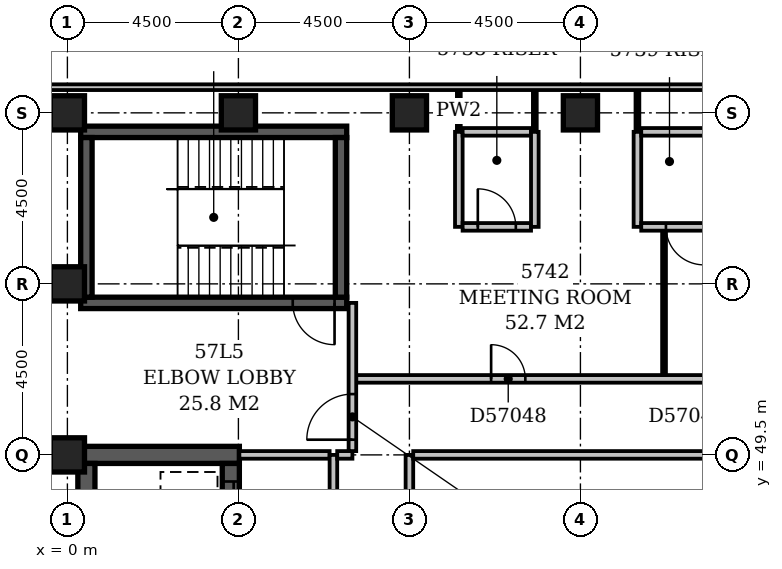
"""IFC4 building model, lengths in metres.
Left out: names, types, materials, properties, quantities, classifications, styles, units other than length and angle.
Written with IfcOpenShell. Run it as: python <this file> out.ifc"""

import sys

from ifc_helpers import new_model, si_unit, direction, frame, frame_2d, origin, origin_2d, place, context, subcontext, project, spatial, rectangle, extrude, element, fill, save


model = new_model("IFC4")
c1 = context("Model", 3, precision=1e-05, world=origin(), true_north=direction((0.0, 1.0)))
c2 = subcontext(c1, "Body", "Model", "MODEL_VIEW")
j1 = project(units=[si_unit("LENGTHUNIT", "METRE"), si_unit("PLANEANGLEUNIT", "RADIAN")], contexts=[c1])
p1 = place(None, origin())
s1 = spatial("IfcSite", under=j1, at=p1, CompositionType="ELEMENT")
p2 = place(p1, origin())
s2 = spatial("IfcBuilding", under=s1, at=p2, CompositionType="ELEMENT")
p3 = place(p2, frame((0.0, 0.0, 222.2)))
s3 = spatial("IfcBuildingStorey", under=s2, at=p3, CompositionType="ELEMENT", Elevation=222.2)
p4 = place(p3, frame((0.275, 49.5, -0.3), z_axis=(0.0, 0.0, 1.0), x_axis=(1.0, 0.0, 0.0)))
e1 = element("IfcWall", 1, at=p4, inside=s3, PredefinedType="SHEAR", context=c2, shape_type="SweptSolid", body=[
    extrude(rectangle(XDim=4.25, YDim=0.45, at=frame_2d((2.125, 0.0))), origin(), (0.0, 0.0, 1.0), 3.6),
])
p5 = place(p3, frame((0.35, 53.5, -0.3), z_axis=(0.0, 0.0, 1.0), x_axis=(1.0, 0.0, 0.0)))
e2 = element("IfcWall", 2, at=p5, inside=s3, PredefinedType="SHEAR", context=c2, shape_type="SweptSolid", body=[
    extrude(rectangle(XDim=7.0, YDim=0.3, at=frame_2d((3.5, 0.0))), origin(), (0.0, 0.0, 1.0), 3.6),
])
p6 = place(p5, frame((5.58, 0.0, 0.3)))
e3 = element("IfcOpeningElement", 3, at=p6, cuts=e2, PredefinedType="OPENING", context=c2, shape_type="SweptSolid", body=[
    extrude(rectangle(XDim=1.1, YDim=2.1, at=frame_2d((0.55, 1.05))), frame((0.0, 0.162, 0.0), z_axis=(0.0, -1.0, 0.0), x_axis=(1.0, 0.0, 0.0)), (0.0, 0.0, 1.0), 0.324),
])
p7 = place(p3, frame((0.35, 58.0, -0.3), z_axis=(0.0, 0.0, 1.0), x_axis=(1.0, 0.0, 0.0)))
e4 = element("IfcWall", 4, at=p7, inside=s3, PredefinedType="SHEAR", context=c2, shape_type="SweptSolid", body=[
    extrude(rectangle(XDim=7.0, YDim=0.3, at=frame_2d((3.5, 0.0))), origin(), (0.0, 0.0, 1.0), 3.6),
])
p8 = place(p3, frame((0.5, 27.15, -0.3), z_axis=(0.0, 0.0, 1.0), x_axis=(0.0, 1.0, 0.0)))
e5 = element("IfcWall", 5, at=p8, inside=s3, PredefinedType="SHEAR", context=c2, shape_type="SweptSolid", body=[
    extrude(rectangle(XDim=22.125, YDim=0.45, at=frame_2d((11.062, 0.0))), origin(), (0.0, 0.0, 1.0), 3.6),
])
p9 = place(p3, frame((0.5, 53.65, -0.3), z_axis=(0.0, 0.0, 1.0), x_axis=(0.0, 1.0, 0.0)))
e6 = element("IfcWall", 6, at=p9, inside=s3, PredefinedType="SHEAR", context=c2, shape_type="SweptSolid", body=[
    extrude(rectangle(XDim=4.2, YDim=0.3, at=frame_2d((2.1, 0.0))), origin(), (0.0, 0.0, 1.0), 3.6),
])
p10 = place(p3, frame((4.3, 27.15, -0.3), z_axis=(0.0, 0.0, 1.0), x_axis=(0.0, 1.0, 0.0)))
e7 = element("IfcWall", 7, at=p10, inside=s3, PredefinedType="SHEAR", context=c2, shape_type="SweptSolid", body=[
    extrude(rectangle(XDim=22.125, YDim=0.45, at=frame_2d((11.062, 0.0))), origin(), (0.0, 0.0, 1.0), 3.6),
])
p11 = place(p10, frame((3.05, 0.0, 0.3)))
e8 = element("IfcOpeningElement", 8, at=p11, cuts=e7, PredefinedType="OPENING", context=c2, shape_type="SweptSolid", body=[
    extrude(rectangle(XDim=1.1, YDim=2.1, at=frame_2d((0.55, 1.05))), frame((0.0, 0.237, 0.0), z_axis=(0.0, -1.0, 0.0), x_axis=(1.0, 0.0, 0.0)), (0.0, 0.0, 1.0), 0.474),
])
p12 = place(p10, frame((0.55, 0.0, 0.3)))
e9 = element("IfcOpeningElement", 9, at=p12, cuts=e7, PredefinedType="OPENING", context=c2, shape_type="SweptSolid", body=[
    extrude(rectangle(XDim=1.1, YDim=2.1, at=frame_2d((0.55, 1.05))), frame((0.0, 0.237, 0.0), z_axis=(0.0, -1.0, 0.0), x_axis=(1.0, 0.0, 0.0)), (0.0, 0.0, 1.0), 0.474),
])
p13 = place(p10, frame((20.55, 0.0, 0.3)))
e10 = element("IfcOpeningElement", 10, at=p13, cuts=e7, PredefinedType="OPENING", context=c2, shape_type="SweptSolid", body=[
    extrude(rectangle(XDim=1.1, YDim=2.1, at=frame_2d((0.55, 1.05))), frame((0.0, 0.237, 0.0), z_axis=(0.0, -1.0, 0.0), x_axis=(1.0, 0.0, 0.0)), (0.0, 0.0, 1.0), 0.474),
])
p14 = place(p10, frame((18.05, 0.0, 0.3)))
e11 = element("IfcOpeningElement", 11, at=p14, cuts=e7, PredefinedType="OPENING", context=c2, shape_type="SweptSolid", body=[
    extrude(rectangle(XDim=1.1, YDim=2.1, at=frame_2d((0.55, 1.05))), frame((0.0, 0.237, 0.0), z_axis=(0.0, -1.0, 0.0), x_axis=(1.0, 0.0, 0.0)), (0.0, 0.0, 1.0), 0.474),
])
p15 = place(p10, frame((15.55, 0.0, 0.3)))
e12 = element("IfcOpeningElement", 12, at=p15, cuts=e7, PredefinedType="OPENING", context=c2, shape_type="SweptSolid", body=[
    extrude(rectangle(XDim=1.1, YDim=2.1, at=frame_2d((0.55, 1.05))), frame((0.0, 0.237, 0.0), z_axis=(0.0, -1.0, 0.0), x_axis=(1.0, 0.0, 0.0)), (0.0, 0.0, 1.0), 0.474),
])
p16 = place(p10, frame((13.05, 0.0, 0.3)))
e13 = element("IfcOpeningElement", 13, at=p16, cuts=e7, PredefinedType="OPENING", context=c2, shape_type="SweptSolid", body=[
    extrude(rectangle(XDim=1.1, YDim=2.1, at=frame_2d((0.55, 1.05))), frame((0.0, 0.237, 0.0), z_axis=(0.0, -1.0, 0.0), x_axis=(1.0, 0.0, 0.0)), (0.0, 0.0, 1.0), 0.474),
])
p17 = place(p10, frame((10.55, 0.0, 0.3)))
e14 = element("IfcOpeningElement", 14, at=p17, cuts=e7, PredefinedType="OPENING", context=c2, shape_type="SweptSolid", body=[
    extrude(rectangle(XDim=1.1, YDim=2.1, at=frame_2d((0.55, 1.05))), frame((0.0, 0.237, 0.0), z_axis=(0.0, -1.0, 0.0), x_axis=(1.0, 0.0, 0.0)), (0.0, 0.0, 1.0), 0.474),
])
p18 = place(p10, frame((8.05, 0.0, 0.3)))
e15 = element("IfcOpeningElement", 15, at=p18, cuts=e7, PredefinedType="OPENING", context=c2, shape_type="SweptSolid", body=[
    extrude(rectangle(XDim=1.1, YDim=2.1, at=frame_2d((0.55, 1.05))), frame((0.0, 0.237, 0.0), z_axis=(0.0, -1.0, 0.0), x_axis=(1.0, 0.0, 0.0)), (0.0, 0.0, 1.0), 0.474),
])
p19 = place(p10, frame((5.55, 0.0, 0.3)))
e16 = element("IfcOpeningElement", 16, at=p19, cuts=e7, PredefinedType="OPENING", context=c2, shape_type="SweptSolid", body=[
    extrude(rectangle(XDim=1.1, YDim=2.1, at=frame_2d((0.55, 1.05))), frame((0.0, 0.237, 0.0), z_axis=(0.0, -1.0, 0.0), x_axis=(1.0, 0.0, 0.0)), (0.0, 0.0, 1.0), 0.474),
])
p20 = place(p3, frame((7.2, 53.65, -0.3), z_axis=(0.0, 0.0, 1.0), x_axis=(0.0, 1.0, 0.0)))
e17 = element("IfcWall", 17, at=p20, inside=s3, PredefinedType="SHEAR", context=c2, shape_type="SweptSolid", body=[
    extrude(rectangle(XDim=4.2, YDim=0.3, at=frame_2d((2.1, 0.0))), origin(), (0.0, 0.0, 1.0), 3.6),
])
for number, where, z_axis, x_axis in (
    (18, (0.0, 49.5, -0.3), (0.0, 0.0, 1.0), (1.0, 0.0, 0.0)),
    (19, (0.0, 54.0, -0.3), (0.0, 0.0, 1.0), (1.0, 0.0, 0.0)),
    (20, (0.0, 58.5, -0.3), (0.0, 0.0, 1.0), (1.0, 0.0, 0.0)),
    (21, (4.5, 58.5, -0.3), (0.0, 0.0, 1.0), (1.0, 0.0, 0.0)),
    (22, (9.0, 58.5, -0.3), (0.0, 0.0, 1.0), (1.0, 0.0, 0.0)),
    (23, (13.5, 58.5, -0.3), (0.0, 0.0, 1.0), (1.0, 0.0, 0.0)),
):
    element("IfcColumn", number, at=place(p3, frame(where, z_axis=z_axis, x_axis=x_axis)), inside=s3, PredefinedType="COLUMN", context=c2, shape_type="SweptSolid", body=[
        extrude(rectangle(XDim=0.9, YDim=0.9, at=origin_2d()), origin(), (0.0, 0.0, 1.0), 3.6),
    ])
p21 = place(p3, frame((50.1, 59.175, 0.0), z_axis=(0.0, 0.0, 1.0), x_axis=(-1.0, 0.0, 0.0)))
e24 = element("IfcWall", 24, at=p21, inside=s3, PredefinedType="STANDARD", context=c2, shape_type="SweptSolid", body=[
    extrude(rectangle(XDim=50.85, YDim=0.15, at=frame_2d((25.425, 0.0))), origin(), (0.0, 0.0, 1.0), 2.7),
])
p22 = place(p3, frame((7.0, 34.6, 0.0), z_axis=(0.0, 0.0, 1.0), x_axis=(0.0, 1.0, 0.0)))
e25 = element("IfcWall", 25, at=p22, inside=s3, PredefinedType="PARTITIONING", context=c2, shape_type="SweptSolid", body=[
    extrude(rectangle(XDim=14.9, YDim=0.2, at=frame_2d((7.45, 0.0))), origin(), (0.0, 0.0, 1.0), 3.3),
])
p23 = place(p22, frame((2.8, 0.0, 0.0)))
e26 = element("IfcOpeningElement", 26, at=p23, cuts=e25, PredefinedType="OPENING", context=c2, shape_type="SweptSolid", body=[
    extrude(rectangle(XDim=1.2, YDim=2.1, at=frame_2d((0.6, 1.05))), frame((0.0, 0.112, 0.0), z_axis=(0.0, -1.0, 0.0), x_axis=(1.0, 0.0, 0.0)), (0.0, 0.0, 1.0), 0.224),
])
p24 = place(p22, frame((9.8, 0.0, 0.0)))
e27 = element("IfcOpeningElement", 27, at=p24, cuts=e25, PredefinedType="OPENING", context=c2, shape_type="SweptSolid", body=[
    extrude(rectangle(XDim=1.2, YDim=2.1, at=frame_2d((0.6, 1.05))), frame((0.0, 0.112, 0.0), z_axis=(0.0, -1.0, 0.0), x_axis=(1.0, 0.0, 0.0)), (0.0, 0.0, 1.0), 0.224),
])
p25 = place(p3, frame((4.525, 49.5, 0.0), z_axis=(0.0, 0.0, 1.0), x_axis=(1.0, 0.0, 0.0)))
e28 = element("IfcWall", 28, at=p25, inside=s3, PredefinedType="PARTITIONING", context=c2, shape_type="SweptSolid", body=[
    extrude(rectangle(XDim=2.375, YDim=0.2, at=frame_2d((1.188, 0.0))), origin(), (0.0, 0.0, 1.0), 3.3),
])
p26 = place(p3, frame((7.1, 49.5, 0.0), z_axis=(0.0, 0.0, 1.0), x_axis=(1.0, 0.0, 0.0)))
e29 = element("IfcWall", 29, at=p26, inside=s3, PredefinedType="PARTITIONING", context=c2, shape_type="SweptSolid", body=[
    extrude(rectangle(XDim=0.4, YDim=0.2, at=frame_2d((0.2, 0.0))), origin(), (0.0, 0.0, 1.0), 3.3),
])
p27 = place(p3, frame((7.5, 49.6, 0.0), z_axis=(0.0, 0.0, 1.0), x_axis=(0.0, 1.0, 0.0)))
e30 = element("IfcWall", 30, at=p27, inside=s3, PredefinedType="PARTITIONING", context=c2, shape_type="SweptSolid", body=[
    extrude(rectangle(XDim=3.9, YDim=0.2, at=frame_2d((1.95, 0.0))), origin(), (0.0, 0.0, 1.0), 3.3),
])
p28 = place(p27, frame((0.3, 0.0, 0.0)))
e31 = element("IfcOpeningElement", 31, at=p28, cuts=e30, PredefinedType="OPENING", context=c2, shape_type="SweptSolid", body=[
    extrude(rectangle(XDim=1.2, YDim=2.1, at=frame_2d((0.6, 1.05))), frame((0.0, 0.112, 0.0), z_axis=(0.0, -1.0, 0.0), x_axis=(1.0, 0.0, 0.0)), (0.0, 0.0, 1.0), 0.224),
])
p29 = place(p3, frame((9.0, 38.0, 0.0), z_axis=(0.0, 0.0, 1.0), x_axis=(0.0, 1.0, 0.0)))
e32 = element("IfcWall", 32, at=p29, inside=s3, PredefinedType="PARTITIONING", context=c2, shape_type="SweptSolid", body=[
    extrude(rectangle(XDim=11.5, YDim=0.2, at=frame_2d((5.75, 0.0))), origin(), (0.0, 0.0, 1.0), 3.3),
])
p30 = place(p29, frame((5.25, 0.0, 0.0)))
e33 = element("IfcOpeningElement", 33, at=p30, cuts=e32, PredefinedType="OPENING", context=c2, shape_type="SweptSolid", body=[
    extrude(rectangle(XDim=0.9, YDim=2.1, at=frame_2d((0.45, 1.05))), frame((0.0, 0.112, 0.0), z_axis=(0.0, -1.0, 0.0), x_axis=(1.0, 0.0, 0.0)), (0.0, 0.0, 1.0), 0.224),
])
p31 = place(p3, frame((9.1, 49.5, 0.0), z_axis=(0.0, 0.0, 1.0), x_axis=(1.0, 0.0, 0.0)))
e34 = element("IfcWall", 34, at=p31, inside=s3, PredefinedType="PARTITIONING", context=c2, shape_type="SweptSolid", body=[
    extrude(rectangle(XDim=11.3, YDim=0.2, at=frame_2d((5.65, 0.0))), origin(), (0.0, 0.0, 1.0), 3.3),
])
p32 = place(p31, frame((9.15, 0.0, 0.0)))
e35 = element("IfcOpeningElement", 35, at=p32, cuts=e34, PredefinedType="OPENING", context=c2, shape_type="SweptSolid", body=[
    extrude(rectangle(XDim=0.9, YDim=2.1, at=frame_2d((0.45, 1.05))), frame((0.0, 0.112, 0.0), z_axis=(0.0, -1.0, 0.0), x_axis=(1.0, 0.0, 0.0)), (0.0, 0.0, 1.0), 0.224),
])
p33 = place(p3, frame((7.6, 51.5, 0.0), z_axis=(0.0, 0.0, 1.0), x_axis=(1.0, 0.0, 0.0)))
e36 = element("IfcWall", 36, at=p33, inside=s3, PredefinedType="PARTITIONING", context=c2, shape_type="SweptSolid", body=[
    extrude(rectangle(XDim=15.3, YDim=0.2, at=frame_2d((7.65, 0.0))), origin(), (0.0, 0.0, 1.0), 3.3),
])
p34 = place(p33, frame((3.55, 0.0, 0.0)))
e37 = element("IfcOpeningElement", 37, at=p34, cuts=e36, PredefinedType="OPENING", context=c2, shape_type="SweptSolid", body=[
    extrude(rectangle(XDim=0.9, YDim=2.1, at=frame_2d((0.45, 1.05))), frame((0.0, 0.112, 0.0), z_axis=(0.0, -1.0, 0.0), x_axis=(1.0, 0.0, 0.0)), (0.0, 0.0, 1.0), 0.224),
])
p35 = place(p33, frame((11.3, 0.0, 0.0)))
e38 = element("IfcOpeningElement", 38, at=p35, cuts=e36, PredefinedType="OPENING", context=c2, shape_type="SweptSolid", body=[
    extrude(rectangle(XDim=0.9, YDim=2.1, at=frame_2d((0.45, 1.05))), frame((0.0, 0.112, 0.0), z_axis=(0.0, -1.0, 0.0), x_axis=(1.0, 0.0, 0.0)), (0.0, 0.0, 1.0), 0.224),
])
p36 = place(p3, frame((15.7, 51.6, 0.0), z_axis=(0.0, 0.0, 1.0), x_axis=(0.0, 1.0, 0.0)))
e39 = element("IfcWall", 39, at=p36, inside=s3, PredefinedType="PARTITIONING", context=c2, shape_type="SweptSolid", body=[
    extrude(rectangle(XDim=3.8, YDim=0.1, at=frame_2d((1.9, 0.0))), origin(), (0.0, 0.0, 1.0), 3.3),
])
p37 = place(p3, frame((10.3, 55.5, 0.0), z_axis=(0.0, 0.0, 1.0), x_axis=(0.0, 1.0, 0.0)))
e40 = element("IfcWall", 40, at=p37, inside=s3, PredefinedType="PARTITIONING", context=c2, shape_type="SweptSolid", body=[
    extrude(rectangle(XDim=2.5, YDim=0.2, at=frame_2d((1.25, 0.0))), origin(), (0.0, 0.0, 1.0), 3.3),
])
p38 = place(p3, frame((10.4, 55.5, 0.0), z_axis=(0.0, 0.0, 1.0), x_axis=(1.0, 0.0, 0.0)))
e41 = element("IfcWall", 41, at=p38, inside=s3, PredefinedType="PARTITIONING", context=c2, shape_type="SweptSolid", body=[
    extrude(rectangle(XDim=1.8, YDim=0.2, at=frame_2d((0.9, 0.0))), origin(), (0.0, 0.0, 1.0), 3.3),
])
p39 = place(p38, frame((0.4, 0.0, 0.0)))
e42 = element("IfcOpeningElement", 42, at=p39, cuts=e41, PredefinedType="OPENING", context=c2, shape_type="SweptSolid", body=[
    extrude(rectangle(XDim=1.0, YDim=2.1, at=frame_2d((0.5, 1.05))), frame((0.0, 0.112, 0.0), z_axis=(0.0, -1.0, 0.0), x_axis=(1.0, 0.0, 0.0)), (0.0, 0.0, 1.0), 0.224),
])
for number, where, z_axis, x_axis in (
    (43, (12.3, 55.5, 0.0), (0.0, 0.0, 1.0), (0.0, 1.0, 0.0)),
    (44, (15.0, 55.5, 0.0), (0.0, 0.0, 1.0), (0.0, 1.0, 0.0)),
):
    element("IfcWall", number, at=place(p3, frame(where, z_axis=z_axis, x_axis=x_axis)), inside=s3, PredefinedType="PARTITIONING", context=c2, shape_type="SweptSolid", body=[
        extrude(rectangle(XDim=2.5, YDim=0.2, at=frame_2d((1.25, 0.0))), origin(), (0.0, 0.0, 1.0), 3.3),
    ])
p40 = place(p3, frame((15.1, 55.5, 0.0), z_axis=(0.0, 0.0, 1.0), x_axis=(1.0, 0.0, 0.0)))
e45 = element("IfcWall", 45, at=p40, inside=s3, PredefinedType="PARTITIONING", context=c2, shape_type="SweptSolid", body=[
    extrude(rectangle(XDim=1.8, YDim=0.2, at=frame_2d((0.9, 0.0))), origin(), (0.0, 0.0, 1.0), 3.3),
])
p41 = place(p40, frame((0.65, 0.0, 0.0)))
e46 = element("IfcOpeningElement", 46, at=p41, cuts=e45, PredefinedType="OPENING", context=c2, shape_type="SweptSolid", body=[
    extrude(rectangle(XDim=1.0, YDim=2.1, at=frame_2d((0.5, 1.05))), frame((0.0, 0.112, 0.0), z_axis=(0.0, -1.0, 0.0), x_axis=(1.0, 0.0, 0.0)), (0.0, 0.0, 1.0), 0.224),
])
p42 = place(p3, frame((10.3, 58.0, 0.0), z_axis=(0.0, 0.0, 1.0), x_axis=(0.0, 1.0, 0.0)))
e47 = element("IfcWall", 47, at=p42, inside=s3, PredefinedType="PARTITIONING", context=c2, shape_type="SweptSolid", body=[
    extrude(rectangle(XDim=1.1, YDim=0.1, at=frame_2d((0.55, 0.0))), origin(), (0.0, 0.0, 1.0), 3.3),
])
p43 = place(p3, frame((10.4, 58.0, 0.0), z_axis=(0.0, 0.0, 1.0), x_axis=(1.0, 0.0, 0.0)))
e48 = element("IfcWall", 48, at=p43, inside=s3, PredefinedType="PARTITIONING", context=c2, shape_type="SweptSolid", body=[
    extrude(rectangle(XDim=1.8, YDim=0.2, at=frame_2d((0.9, 0.0))), origin(), (0.0, 0.0, 1.0), 3.3),
])
for number, where, z_axis, x_axis in (
    (49, (12.3, 58.0, 0.0), (0.0, 0.0, 1.0), (0.0, 1.0, 0.0)),
    (50, (15.0, 58.0, 0.0), (0.0, 0.0, 1.0), (0.0, 1.0, 0.0)),
):
    element("IfcWall", number, at=place(p3, frame(where, z_axis=z_axis, x_axis=x_axis)), inside=s3, PredefinedType="PARTITIONING", context=c2, shape_type="SweptSolid", body=[
        extrude(rectangle(XDim=1.1, YDim=0.1, at=frame_2d((0.55, 0.0))), origin(), (0.0, 0.0, 1.0), 3.3),
    ])
p44 = place(p3, frame((15.1, 58.0, 0.0), z_axis=(0.0, 0.0, 1.0), x_axis=(1.0, 0.0, 0.0)))
e51 = element("IfcWall", 51, at=p44, inside=s3, PredefinedType="PARTITIONING", context=c2, shape_type="SweptSolid", body=[
    extrude(rectangle(XDim=1.8, YDim=0.2, at=frame_2d((0.9, 0.0))), origin(), (0.0, 0.0, 1.0), 3.3),
])
p45 = place(p28, origin())
e52 = element("IfcDoor", 52, at=p45, inside=s3, OperationType="SINGLE_SWING_LEFT", PredefinedType="DOOR", context=c2, shape_type="SweptSolid", body=[
    extrude(rectangle(XDim=1.2, YDim=2.1, at=frame_2d((0.6, 1.05))), frame((0.0, 0.025, 0.0), z_axis=(0.0, -1.0, 0.0), x_axis=(1.0, 0.0, 0.0)), (0.0, 0.0, 1.0), 0.05),
])
fill(e31, e52)
p46 = place(p13, origin())
e53 = element("IfcDoor", 53, at=p46, inside=s3, OperationType="SLIDING_TO_LEFT", PredefinedType="DOOR", context=c2, shape_type="SweptSolid", body=[
    extrude(rectangle(XDim=1.1, YDim=2.1, at=frame_2d((0.55, 1.05))), frame((0.0, 0.025, 0.0), z_axis=(0.0, -1.0, 0.0), x_axis=(1.0, 0.0, 0.0)), (0.0, 0.0, 1.0), 0.05),
])
fill(e10, e53)
p47 = place(p6, origin())
e54 = element("IfcDoor", 54, at=p47, inside=s3, OperationType="SINGLE_SWING_RIGHT", PredefinedType="DOOR", context=c2, shape_type="SweptSolid", body=[
    extrude(rectangle(XDim=1.1, YDim=2.1, at=frame_2d((0.55, 1.05))), frame((0.0, 0.025, 0.0), z_axis=(0.0, -1.0, 0.0), x_axis=(1.0, 0.0, 0.0)), (0.0, 0.0, 1.0), 0.05),
])
fill(e3, e54)
p48 = place(p34, origin())
e55 = element("IfcDoor", 55, at=p48, inside=s3, OperationType="SINGLE_SWING_LEFT", PredefinedType="DOOR", context=c2, shape_type="SweptSolid", body=[
    extrude(rectangle(XDim=0.9, YDim=2.1, at=frame_2d((0.45, 1.05))), frame((0.0, 0.025, 0.0), z_axis=(0.0, -1.0, 0.0), x_axis=(1.0, 0.0, 0.0)), (0.0, 0.0, 1.0), 0.05),
])
fill(e37, e55)
p49 = place(p39, origin())
e56 = element("IfcDoor", 56, at=p49, inside=s3, OperationType="SINGLE_SWING_LEFT", PredefinedType="DOOR", context=c2, shape_type="SweptSolid", body=[
    extrude(rectangle(XDim=1.0, YDim=2.1, at=frame_2d((0.5, 1.05))), frame((0.0, 0.025, 0.0), z_axis=(0.0, -1.0, 0.0), x_axis=(1.0, 0.0, 0.0)), (0.0, 0.0, 1.0), 0.05),
])
fill(e42, e56)
p50 = place(p41, origin())
e57 = element("IfcDoor", 57, at=p50, inside=s3, OperationType="SINGLE_SWING_RIGHT", PredefinedType="DOOR", context=c2, shape_type="SweptSolid", body=[
    extrude(rectangle(XDim=1.0, YDim=2.1, at=frame_2d((0.5, 1.05))), frame((0.0, 0.025, 0.0), z_axis=(0.0, -1.0, 0.0), x_axis=(1.0, 0.0, 0.0)), (0.0, 0.0, 1.0), 0.05),
])
fill(e46, e57)
save(model, sys.argv[1])
